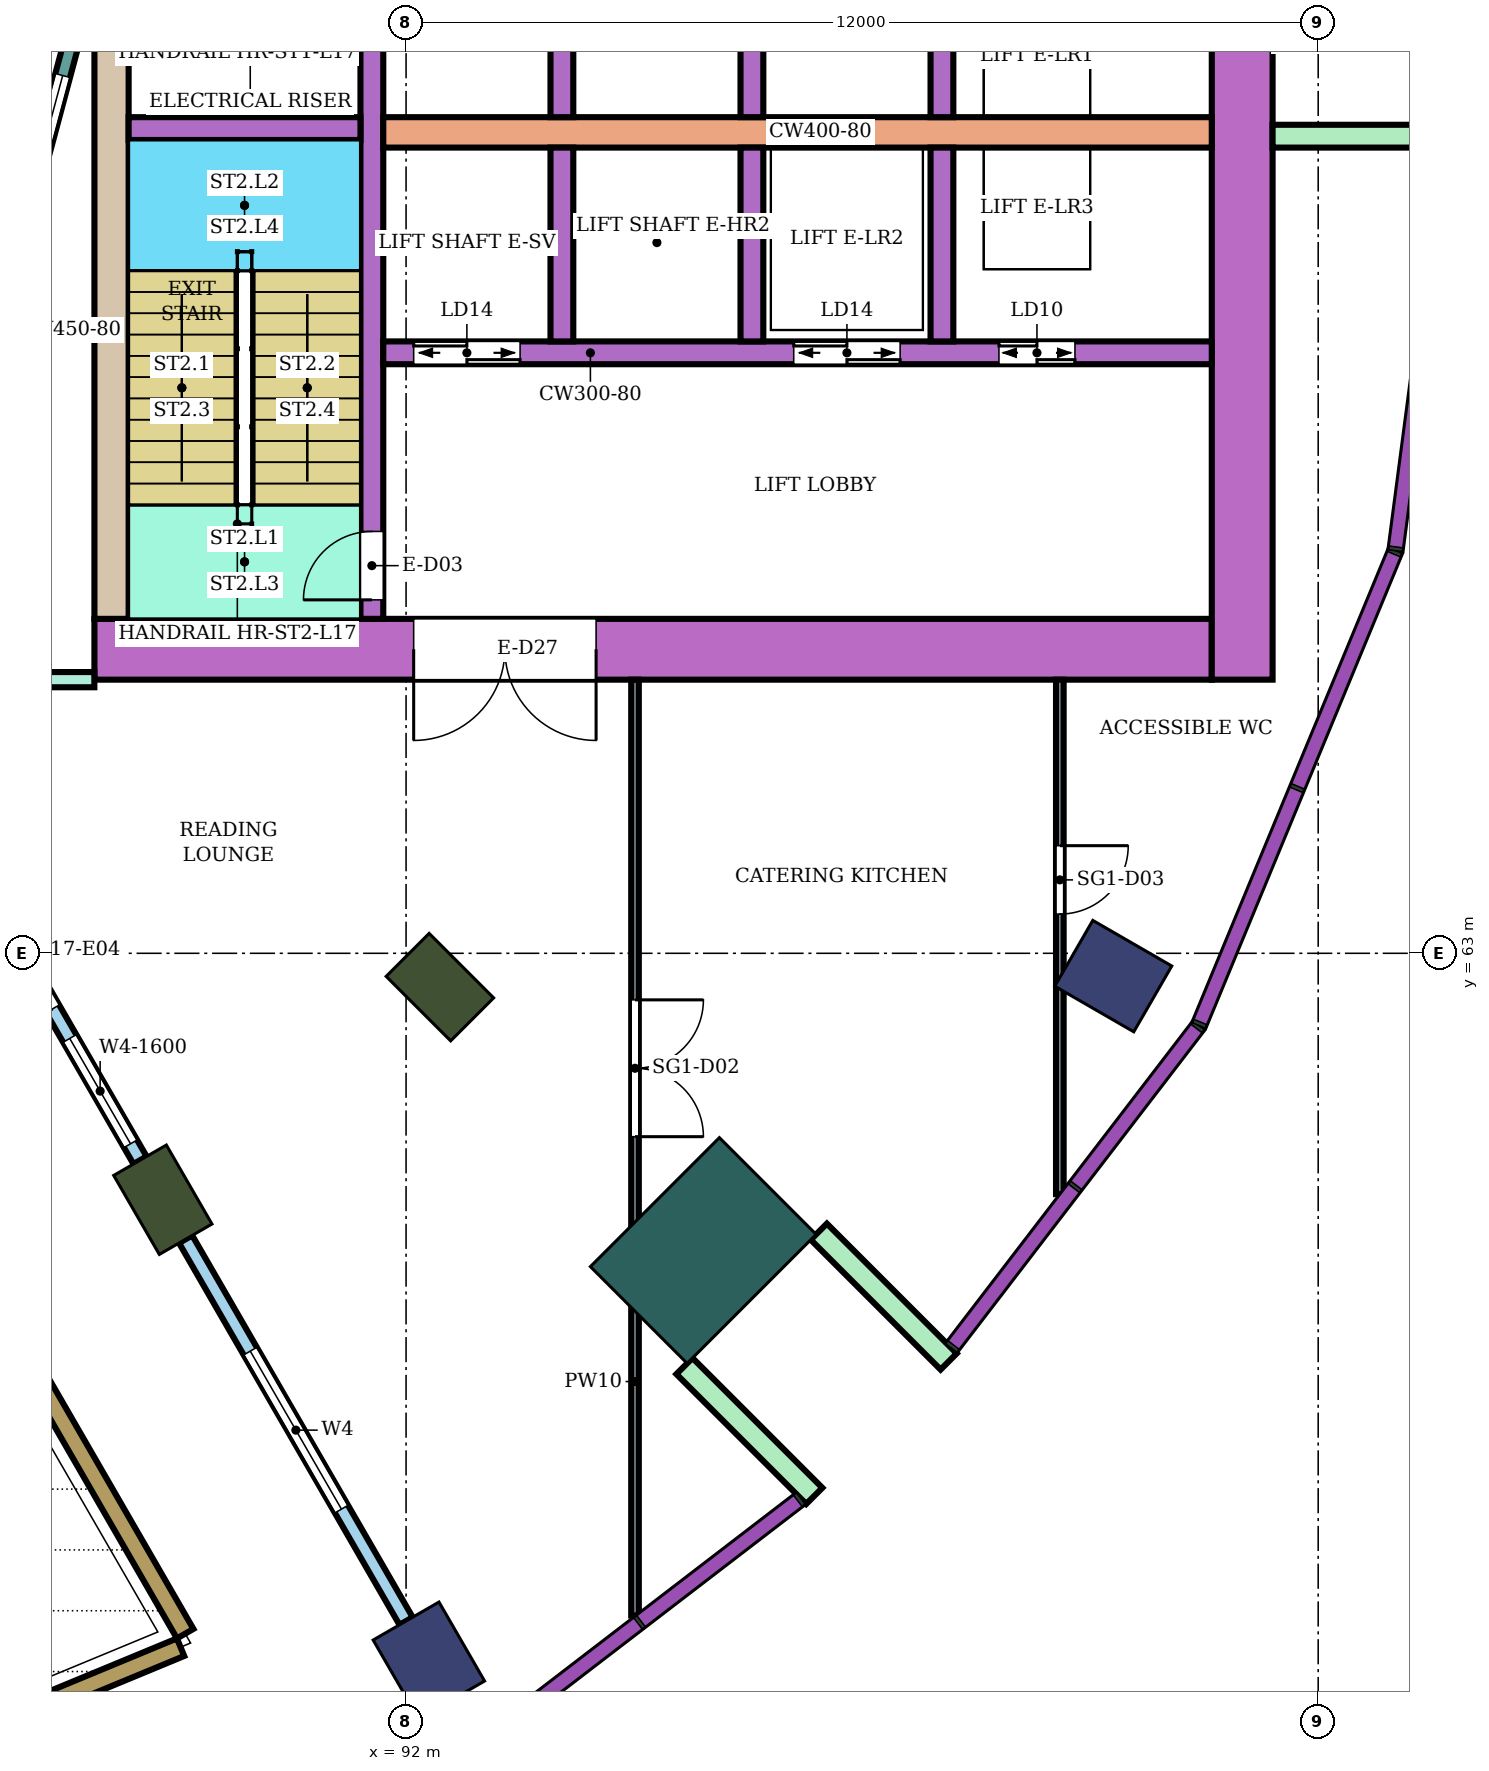
"""IFC4 building model, lengths in metres.
Left out: names, types, materials, properties, quantities, classifications, styles, units other than length and angle.
Written with IfcOpenShell. Run it as: python <this file> out.ifc"""

import sys

from ifc_helpers import new_model, si_unit, direction, frame, frame_2d, origin, origin_2d, place, context, subcontext, project, spatial, rectangle, extrude, element, fill, save


model = new_model("IFC4")
c1 = context("Model", 3, precision=1e-05, world=origin(), true_north=direction((0.0, 1.0)))
c2 = subcontext(c1, "Body", "Model", "MODEL_VIEW")
j1 = project(units=[si_unit("LENGTHUNIT", "METRE"), si_unit("PLANEANGLEUNIT", "RADIAN")], contexts=[c1])
p1 = place(None, origin())
s1 = spatial("IfcSite", under=j1, at=p1, CompositionType="ELEMENT")
p2 = place(p1, origin())
s2 = spatial("IfcBuilding", under=s1, at=p2, CompositionType="ELEMENT")
p3 = place(p2, frame((0.0, 0.0, 74.4)))
s3 = spatial("IfcBuildingStorey", under=s2, at=p3, CompositionType="ELEMENT", Elevation=74.4)
for number, where, z_axis, x_axis in (
    (1, (92.3, 53.696, 0.0), (0.0, 0.0, 1.0), (0.5, -0.866, 0.0)),
    (2, (101.304, 62.7, 0.0), (0.0, 0.0, 1.0), (0.866, -0.5, 0.0)),
):
    element("IfcColumn", number, at=place(p3, frame(where, z_axis=z_axis, x_axis=x_axis)), inside=s3, PredefinedType="COLUMN", context=c2, shape_type="SweptSolid", body=[
        extrude(rectangle(XDim=1.2, YDim=1.0, at=origin_2d()), origin(), (0.0, 0.0, 1.0), 8.0),
    ])
for number, where, z_axis, x_axis in (
    (3, (88.8, 59.758, 0.0), (0.0, 0.0, 1.0), (0.5, -0.866, 0.0)),
    (4, (92.445, 62.555, 0.0), (0.0, 0.0, 1.0), (0.707, -0.707, 0.0)),
):
    element("IfcColumn", number, at=place(p3, frame(where, z_axis=z_axis, x_axis=x_axis)), inside=s3, PredefinedType="COLUMN", context=c2, shape_type="SweptSolid", body=[
        extrude(rectangle(XDim=1.2, YDim=0.8, at=origin_2d()), origin(), (0.0, 0.0, 1.0), 8.0),
    ])
p4 = place(p3, frame((95.91, 59.09, 0.0), z_axis=(0.0, 0.0, 1.0), x_axis=(0.707106781187, -0.707106781187, 0.0)))
e5 = element("IfcColumn", 5, at=p4, inside=s3, PredefinedType="COLUMN", context=c2, shape_type="SweptSolid", body=[
    extrude(rectangle(XDim=1.8, YDim=2.4, at=origin_2d()), origin(), (0.0, 0.0, 1.0), 8.0),
])
p5 = place(p3, frame((87.9, 67.0, 0.0), z_axis=(0.0, 0.0, 1.0), x_axis=(1.0, 0.0, 0.0)))
e6 = element("IfcWall", 6, at=p5, inside=s3, PredefinedType="SHEAR", context=c2, shape_type="SweptSolid", body=[
    extrude(rectangle(XDim=14.7, YDim=0.8, at=frame_2d((7.35, 0.0))), origin(), (0.0, 0.0, 1.0), 7.68),
])
p6 = place(p5, frame((4.2, 0.0, 0.0)))
e7 = element("IfcOpeningElement", 7, at=p6, cuts=e6, PredefinedType="OPENING", context=c2, shape_type="SweptSolid", body=[
    extrude(rectangle(XDim=2.4, YDim=2.4, at=frame_2d((1.2, 1.2))), frame((0.0, 0.41, 0.0), z_axis=(0.0, -1.0, 0.0), x_axis=(1.0, 0.0, 0.0)), (0.0, 0.0, 1.0), 0.82),
])
p7 = place(p3, frame((88.125, 67.4, 0.0), z_axis=(0.0, 0.0, 1.0), x_axis=(0.0, 1.0, 0.0)))
e8 = element("IfcWall", 8, at=p7, inside=s3, PredefinedType="SHEAR", context=c2, shape_type="SweptSolid", body=[
    extrude(rectangle(XDim=7.6, YDim=0.45, at=frame_2d((3.8, 0.0))), origin(), (0.0, 0.0, 1.0), 7.68),
])
p8 = place(p3, frame((103.0, 66.6, 0.0), z_axis=(0.0, 0.0, 1.0), x_axis=(0.0, 1.0, 0.0)))
e9 = element("IfcWall", 9, at=p8, inside=s3, PredefinedType="SHEAR", context=c2, shape_type="SweptSolid", body=[
    extrude(rectangle(XDim=16.8, YDim=0.8, at=frame_2d((8.4, 0.0))), origin(), (0.0, 0.0, 1.0), 7.68),
])
p9 = place(p3, frame((91.55, 67.4, 0.0), z_axis=(0.0, 0.0, 1.0), x_axis=(0.0, 1.0, 0.0)))
e10 = element("IfcWall", 10, at=p9, inside=s3, PredefinedType="SHEAR", context=c2, shape_type="SweptSolid", body=[
    extrude(rectangle(XDim=7.6, YDim=0.3, at=frame_2d((3.8, 0.0))), origin(), (0.0, 0.0, 1.0), 7.68),
])
p10 = place(p9, frame((0.25, 0.0, 0.0)))
e11 = element("IfcOpeningElement", 11, at=p10, cuts=e10, PredefinedType="OPENING", context=c2, shape_type="SweptSolid", body=[
    extrude(rectangle(XDim=0.9, YDim=2.1, at=frame_2d((0.45, 1.05))), frame((0.0, 0.16, 0.0), z_axis=(0.0, -1.0, 0.0), x_axis=(1.0, 0.0, 0.0)), (0.0, 0.0, 1.0), 0.32),
])
p11 = place(p3, frame((88.35, 73.85, 0.0), z_axis=(0.0, 0.0, 1.0), x_axis=(1.0, 0.0, 0.0)))
e12 = element("IfcWall", 12, at=p11, inside=s3, PredefinedType="SHEAR", context=c2, shape_type="SweptSolid", body=[
    extrude(rectangle(XDim=3.05, YDim=0.3, at=frame_2d((1.525, 0.0))), origin(), (0.0, 0.0, 1.0), 7.68),
])
p12 = place(p3, frame((91.7, 73.8, 0.0), z_axis=(0.0, 0.0, 1.0), x_axis=(1.0, 0.0, 0.0)))
e13 = element("IfcWall", 13, at=p12, inside=s3, PredefinedType="SHEAR", context=c2, shape_type="SweptSolid", body=[
    extrude(rectangle(XDim=10.9, YDim=0.4, at=frame_2d((5.45, 0.0))), origin(), (0.0, 0.0, 1.0), 7.68),
])
p13 = place(p3, frame((91.7, 70.9, 0.0), z_axis=(0.0, 0.0, 1.0), x_axis=(1.0, 0.0, 0.0)))
e14 = element("IfcWall", 14, at=p13, inside=s3, PredefinedType="SHEAR", context=c2, shape_type="SweptSolid", body=[
    extrude(rectangle(XDim=10.9, YDim=0.3, at=frame_2d((5.45, 0.0))), origin(), (0.0, 0.0, 1.0), 7.68),
])
p14 = place(p13, frame((0.4, 0.0, 0.0)))
e15 = element("IfcOpeningElement", 15, at=p14, cuts=e14, PredefinedType="OPENING", context=c2, shape_type="SweptSolid", body=[
    extrude(rectangle(XDim=1.4, YDim=2.1, at=frame_2d((0.7, 1.05))), frame((0.0, 0.16, 0.0), z_axis=(0.0, -1.0, 0.0), x_axis=(1.0, 0.0, 0.0)), (0.0, 0.0, 1.0), 0.32),
])
p15 = place(p13, frame((5.4, 0.0, 0.0)))
e16 = element("IfcOpeningElement", 16, at=p15, cuts=e14, PredefinedType="OPENING", context=c2, shape_type="SweptSolid", body=[
    extrude(rectangle(XDim=1.4, YDim=2.1, at=frame_2d((0.7, 1.05))), frame((0.0, 0.16, 0.0), z_axis=(0.0, -1.0, 0.0), x_axis=(1.0, 0.0, 0.0)), (0.0, 0.0, 1.0), 0.32),
])
p16 = place(p13, frame((8.1, 0.0, 0.0)))
e17 = element("IfcOpeningElement", 17, at=p16, cuts=e14, PredefinedType="OPENING", context=c2, shape_type="SweptSolid", body=[
    extrude(rectangle(XDim=1.0, YDim=2.1, at=frame_2d((0.5, 1.05))), frame((0.0, 0.16, 0.0), z_axis=(0.0, -1.0, 0.0), x_axis=(1.0, 0.0, 0.0)), (0.0, 0.0, 1.0), 0.32),
])
for number, where, z_axis, x_axis in (
    (18, (94.05, 74.0, 0.0), (0.0, 0.0, 1.0), (0.0, 1.0, 0.0)),
    (19, (96.55, 74.0, 0.0), (0.0, 0.0, 1.0), (0.0, 1.0, 0.0)),
    (20, (99.05, 74.0, 0.0), (0.0, 0.0, 1.0), (0.0, 1.0, 0.0)),
    (21, (94.05, 71.05, 0.0), (0.0, 0.0, 1.0), (0.0, 1.0, 0.0)),
    (22, (96.55, 71.05, 0.0), (0.0, 0.0, 1.0), (0.0, 1.0, 0.0)),
    (23, (99.05, 71.05, 0.0), (0.0, 0.0, 1.0), (0.0, 1.0, 0.0)),
):
    element("IfcWall", number, at=place(p3, frame(where, z_axis=z_axis, x_axis=x_axis)), inside=s3, PredefinedType="SHEAR", context=c2, shape_type="SweptSolid", body=[
        extrude(rectangle(XDim=2.55, YDim=0.3, at=frame_2d((1.275, 0.0))), origin(), (0.0, 0.0, 1.0), 7.68),
    ])
for number, where, z_axis, x_axis in (
    (24, (103.4, 73.75, 0.0), (0.0, 0.0, 1.0), (1.0, 0.0, 0.0)),
    (25, (95.662, 57.57, 0.0), (0.0, 0.0, 1.0), (0.707, -0.707, 0.0)),
    (26, (97.43, 59.338, 0.0), (0.0, 0.0, 1.0), (0.707, -0.707, 0.0)),
):
    element("IfcWall", number, at=place(p3, frame(where, z_axis=z_axis, x_axis=x_axis)), inside=s3, PredefinedType="NOTDEFINED", context=c2, shape_type="SweptSolid", body=[
        extrude(rectangle(XDim=2.416, YDim=0.3, at=frame_2d((1.208, 0.0))), origin(), (0.0, 0.0, 1.0), 8.0),
    ])
p17 = place(p3, frame((86.585, 71.198, 0.0), z_axis=(0.0, 0.0, 1.0), x_axis=(0.258789828301, 0.965933654434, 0.0)))
e27 = element("IfcWall", 27, at=p17, inside=s3, PredefinedType="NOTDEFINED", context=c2, shape_type="SweptSolid", body=[
    extrude(rectangle(XDim=3.936, YDim=0.2, at=frame_2d((1.968, 0.0))), origin(), (0.0, 0.0, 1.0), 8.0),
])
p18 = place(p17, frame((0.468, 0.0, 0.9)))
e28 = element("IfcOpeningElement", 28, at=p18, cuts=e27, PredefinedType="OPENING", context=c2, shape_type="SweptSolid", body=[
    extrude(rectangle(XDim=3.0, YDim=2.3, at=frame_2d((1.5, 1.15))), frame((0.0, 0.11, 0.0), z_axis=(0.0, -1.0, 0.0), x_axis=(1.0, 0.0, 0.0)), (0.0, 0.0, 1.0), 0.22),
])
p19 = place(p3, frame((86.014, 52.62, 0.0), z_axis=(0.0, 0.0, 1.0), x_axis=(0.923863886655, 0.382721202621, 0.0)))
e29 = element("IfcWall", 29, at=p19, inside=s3, PredefinedType="USERDEFINED", context=c2, shape_type="SweptSolid", body=[
    extrude(rectangle(XDim=3.269, YDim=0.25, at=frame_2d((1.634, 0.0))), origin(), (0.0, 0.0, 1.0), 0.6),
])
p20 = place(p3, frame((89.094, 54.049, 0.0), z_axis=(0.0, 0.0, 1.0), x_axis=(-0.50000795037, 0.866020813587, 0.0)))
e30 = element("IfcWall", 30, at=p20, inside=s3, PredefinedType="USERDEFINED", context=c2, shape_type="SweptSolid", body=[
    extrude(rectangle(XDim=5.823, YDim=0.25, at=frame_2d((2.912, 0.0))), origin(), (0.0, 0.0, 1.0), 0.6),
])
p21 = place(p3, frame((84.525, 67.162, 0.0), z_axis=(0.0, 0.0, 1.0), x_axis=(0.50001663867, -0.86601579723, 0.0)))
e31 = element("IfcWall", 31, at=p21, inside=s3, PredefinedType="NOTDEFINED", context=c2, shape_type="SweptSolid", body=[
    extrude(rectangle(XDim=7.95, YDim=0.2, at=frame_2d((3.975, 0.0))), origin(), (0.0, 0.0, 1.0), 8.0),
])
p22 = place(p21, frame((1.0, 0.0, 0.3)))
e32 = element("IfcOpeningElement", 32, at=p22, cuts=e31, PredefinedType="OPENING", context=c2, shape_type="SweptSolid", body=[
    extrude(rectangle(XDim=2.4, YDim=3.6, at=frame_2d((1.2, 1.8))), frame((0.0, 0.11, 0.0), z_axis=(0.0, -1.0, 0.0), x_axis=(1.0, 0.0, 0.0)), (0.0, 0.0, 1.0), 0.22),
])
p23 = place(p21, frame((3.85, 0.0, 0.0)))
e33 = element("IfcOpeningElement", 33, at=p23, cuts=e31, PredefinedType="OPENING", context=c2, shape_type="SweptSolid", body=[
    extrude(rectangle(XDim=1.8, YDim=2.4, at=frame_2d((0.9, 1.2))), frame((0.0, 0.11, 0.0), z_axis=(0.0, -1.0, 0.0), x_axis=(1.0, 0.0, 0.0)), (0.0, 0.0, 1.0), 0.22),
])
p24 = place(p21, frame((6.1, 0.0, 0.3)))
e34 = element("IfcOpeningElement", 34, at=p24, cuts=e31, PredefinedType="OPENING", context=c2, shape_type="SweptSolid", body=[
    extrude(rectangle(XDim=1.6, YDim=3.6, at=frame_2d((0.8, 1.8))), frame((0.0, 0.11, 0.0), z_axis=(0.0, -1.0, 0.0), x_axis=(1.0, 0.0, 0.0)), (0.0, 0.0, 1.0), 0.22),
])
p25 = place(p3, frame((89.1, 59.238, 0.0), z_axis=(0.0, 0.0, 1.0), x_axis=(0.499987231761, -0.866032775405, 0.0)))
e35 = element("IfcWall", 35, at=p25, inside=s3, PredefinedType="NOTDEFINED", context=c2, shape_type="SweptSolid", body=[
    extrude(rectangle(XDim=5.8, YDim=0.2, at=frame_2d((2.9, 0.0))), origin(), (0.0, 0.0, 1.0), 8.0),
])
p26 = place(p25, frame((1.7, 0.0, 0.3)))
e36 = element("IfcOpeningElement", 36, at=p26, cuts=e35, PredefinedType="OPENING", context=c2, shape_type="SweptSolid", body=[
    extrude(rectangle(XDim=2.4, YDim=3.6, at=frame_2d((1.2, 1.8))), frame((0.0, 0.11, 0.0), z_axis=(0.0, -1.0, 0.0), x_axis=(1.0, 0.0, 0.0)), (0.0, 0.0, 1.0), 0.22),
])
p27 = place(p3, frame((84.851, 66.6, 0.0), z_axis=(0.0, 0.0, 1.0), x_axis=(1.0, 0.0, 0.0)))
e37 = element("IfcWall", 37, at=p27, inside=s3, PredefinedType="PARTITIONING", context=c2, shape_type="SweptSolid", body=[
    extrude(rectangle(XDim=3.048, YDim=0.2, at=frame_2d((1.524, 0.0))), origin(), (0.0, 0.0, 1.0), 7.55),
])
p28 = place(p3, frame((95.012, 54.288, 0.0), z_axis=(0.0, 0.0, 1.0), x_axis=(0.0, 1.0, 0.0)))
e38 = element("IfcWall", 38, at=p28, inside=s3, PredefinedType="PARTITIONING", context=c2, shape_type="SweptSolid", body=[
    extrude(rectangle(XDim=12.312, YDim=0.1, at=frame_2d((6.156, 0.0))), origin(), (0.0, 0.0, 1.0), 7.55),
])
p29 = place(p28, frame((6.3, 0.0, 0.0)))
e39 = element("IfcOpeningElement", 39, at=p29, cuts=e38, PredefinedType="OPENING", context=c2, shape_type="SweptSolid", body=[
    extrude(rectangle(XDim=1.8, YDim=2.1, at=frame_2d((0.9, 1.05))), frame((0.0, 0.06, 0.0), z_axis=(0.0, -1.0, 0.0), x_axis=(1.0, 0.0, 0.0)), (0.0, 0.0, 1.0), 0.12),
])
p30 = place(p3, frame((100.601, 59.832, 0.0), z_axis=(0.0, 0.0, 1.0), x_axis=(0.0, 1.0, 0.0)))
e40 = element("IfcWall", 40, at=p30, inside=s3, PredefinedType="PARTITIONING", context=c2, shape_type="SweptSolid", body=[
    extrude(rectangle(XDim=6.768, YDim=0.1, at=frame_2d((3.384, 0.0))), origin(), (0.0, 0.0, 1.0), 7.55),
])
p31 = place(p30, frame((3.684, 0.0, 0.0)))
e41 = element("IfcOpeningElement", 41, at=p31, cuts=e40, PredefinedType="OPENING", context=c2, shape_type="SweptSolid", body=[
    extrude(rectangle(XDim=0.9, YDim=2.1, at=frame_2d((0.45, 1.05))), frame((0.0, 0.06, 0.0), z_axis=(0.0, -1.0, 0.0), x_axis=(1.0, 0.0, 0.0)), (0.0, 0.0, 1.0), 0.12),
])
p32 = place(p18, origin())
e42 = element("IfcWindow", 42, at=p32, inside=s3, PartitioningType="SINGLE_PANEL", PredefinedType="WINDOW", context=c2, shape_type="SweptSolid", body=[
    extrude(rectangle(XDim=3.0, YDim=2.3, at=frame_2d((1.5, 1.15))), frame((0.0, 0.03, 0.0), z_axis=(0.0, -1.0, 0.0), x_axis=(1.0, 0.0, 0.0)), (0.0, 0.0, 1.0), 0.06),
])
fill(e28, e42)
p33 = place(p23, frame((1.8, 0.0, 0.0), z_axis=(0.0, 0.0, 1.0), x_axis=(-1.0, 0.0, 0.0)))
e43 = element("IfcDoor", 43, at=p33, inside=s3, OperationType="DOUBLE_DOOR_SINGLE_SWING", PredefinedType="DOOR", context=c2, shape_type="SweptSolid", body=[
    extrude(rectangle(XDim=1.8, YDim=2.4, at=frame_2d((0.9, 1.2))), frame((0.0, 0.025, 0.0), z_axis=(0.0, -1.0, 0.0), x_axis=(1.0, 0.0, 0.0)), (0.0, 0.0, 1.0), 0.05),
])
fill(e33, e43)
p34 = place(p24, origin())
e44 = element("IfcWindow", 44, at=p34, inside=s3, PartitioningType="SINGLE_PANEL", PredefinedType="WINDOW", context=c2, shape_type="SweptSolid", body=[
    extrude(rectangle(XDim=1.6, YDim=3.6, at=frame_2d((0.8, 1.8))), frame((0.0, 0.03, 0.0), z_axis=(0.0, -1.0, 0.0), x_axis=(1.0, 0.0, 0.0)), (0.0, 0.0, 1.0), 0.06),
])
fill(e34, e44)
p35 = place(p26, origin())
e45 = element("IfcWindow", 45, at=p35, inside=s3, PartitioningType="SINGLE_PANEL", PredefinedType="WINDOW", context=c2, shape_type="SweptSolid", body=[
    extrude(rectangle(XDim=2.4, YDim=3.6, at=frame_2d((1.2, 1.8))), frame((0.0, 0.03, 0.0), z_axis=(0.0, -1.0, 0.0), x_axis=(1.0, 0.0, 0.0)), (0.0, 0.0, 1.0), 0.06),
])
fill(e36, e45)
p36 = place(p29, frame((1.8, 0.0, 0.0), z_axis=(0.0, 0.0, 1.0), x_axis=(-1.0, 0.0, 0.0)))
e46 = element("IfcDoor", 46, at=p36, inside=s3, OperationType="DOUBLE_DOOR_SINGLE_SWING", PredefinedType="DOOR", context=c2, shape_type="SweptSolid", body=[
    extrude(rectangle(XDim=1.8, YDim=2.1, at=frame_2d((0.9, 1.05))), frame((0.0, 0.025, 0.0), z_axis=(0.0, -1.0, 0.0), x_axis=(1.0, 0.0, 0.0)), (0.0, 0.0, 1.0), 0.05),
])
fill(e39, e46)
p37 = place(p31, frame((0.9, 0.0, 0.0), z_axis=(0.0, 0.0, 1.0), x_axis=(-1.0, 0.0, 0.0)))
e47 = element("IfcDoor", 47, at=p37, inside=s3, OperationType="SINGLE_SWING_LEFT", PredefinedType="DOOR", context=c2, shape_type="SweptSolid", body=[
    extrude(rectangle(XDim=0.9, YDim=2.1, at=frame_2d((0.45, 1.05))), frame((0.0, 0.025, 0.0), z_axis=(0.0, -1.0, 0.0), x_axis=(1.0, 0.0, 0.0)), (0.0, 0.0, 1.0), 0.05),
])
fill(e41, e47)
p38 = place(p10, origin())
e48 = element("IfcDoor", 48, at=p38, inside=s3, OperationType="SINGLE_SWING_LEFT", PredefinedType="DOOR", context=c2, shape_type="SweptSolid", body=[
    extrude(rectangle(XDim=0.9, YDim=2.1, at=frame_2d((0.45, 1.05))), frame((0.0, 0.025, 0.0), z_axis=(0.0, -1.0, 0.0), x_axis=(1.0, 0.0, 0.0)), (0.0, 0.0, 1.0), 0.05),
])
fill(e11, e48)
p39 = place(p14, origin())
e49 = element("IfcDoor", 49, at=p39, inside=s3, OperationType="DOUBLE_DOOR_SLIDING", PredefinedType="DOOR", context=c2, shape_type="SweptSolid", body=[
    extrude(rectangle(XDim=1.4, YDim=2.1, at=frame_2d((0.7, 1.05))), frame((0.0, 0.025, 0.0), z_axis=(0.0, -1.0, 0.0), x_axis=(1.0, 0.0, 0.0)), (0.0, 0.0, 1.0), 0.05),
])
fill(e15, e49)
p40 = place(p15, origin())
e50 = element("IfcDoor", 50, at=p40, inside=s3, OperationType="DOUBLE_DOOR_SLIDING", PredefinedType="DOOR", context=c2, shape_type="SweptSolid", body=[
    extrude(rectangle(XDim=1.4, YDim=2.1, at=frame_2d((0.7, 1.05))), frame((0.0, 0.025, 0.0), z_axis=(0.0, -1.0, 0.0), x_axis=(1.0, 0.0, 0.0)), (0.0, 0.0, 1.0), 0.05),
])
fill(e16, e50)
p41 = place(p16, origin())
e51 = element("IfcDoor", 51, at=p41, inside=s3, OperationType="DOUBLE_DOOR_SLIDING", PredefinedType="DOOR", context=c2, shape_type="SweptSolid", body=[
    extrude(rectangle(XDim=1.0, YDim=2.1, at=frame_2d((0.5, 1.05))), frame((0.0, 0.025, 0.0), z_axis=(0.0, -1.0, 0.0), x_axis=(1.0, 0.0, 0.0)), (0.0, 0.0, 1.0), 0.05),
])
fill(e17, e51)
p42 = place(p6, frame((2.4, 0.0, 0.0), z_axis=(0.0, 0.0, 1.0), x_axis=(-1.0, 0.0, 0.0)))
e52 = element("IfcDoor", 52, at=p42, inside=s3, OperationType="DOUBLE_DOOR_SINGLE_SWING", PredefinedType="DOOR", context=c2, shape_type="SweptSolid", body=[
    extrude(rectangle(XDim=2.4, YDim=2.4, at=frame_2d((1.2, 1.2))), frame((0.0, 0.025, 0.0), z_axis=(0.0, -1.0, 0.0), x_axis=(1.0, 0.0, 0.0)), (0.0, 0.0, 1.0), 0.05),
])
fill(e7, e52)
save(model, sys.argv[1])
